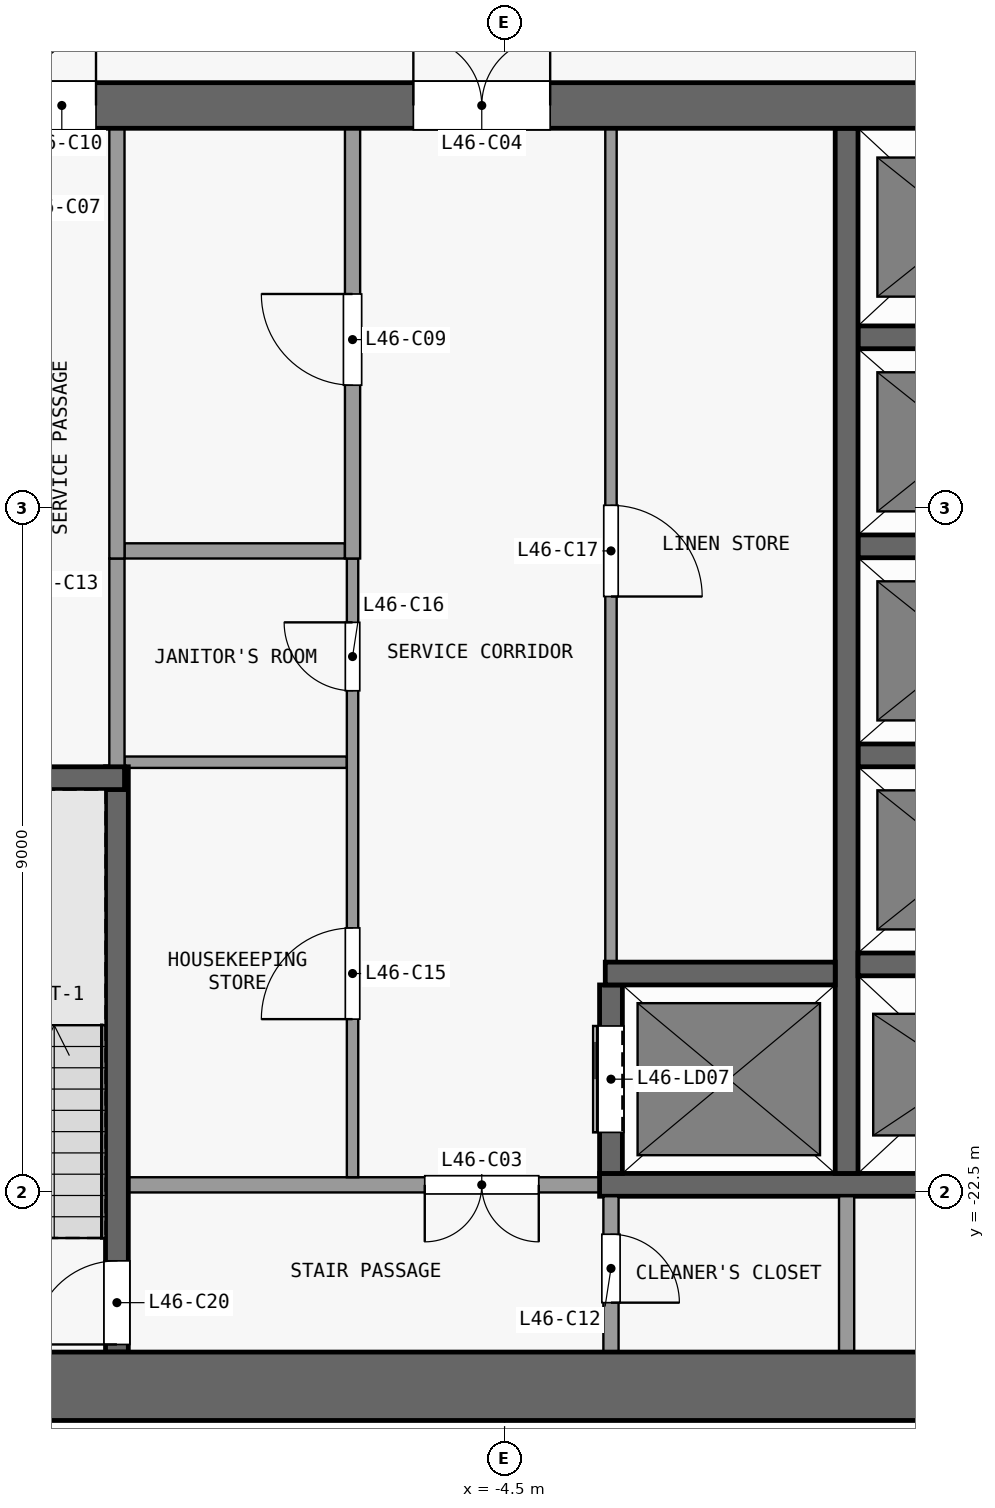
"""IFC4 building model, lengths in metres.
Left out: names, types, materials, properties, quantities, classifications, styles, units other than length and angle.
Written with IfcOpenShell. Run it as: python <this file> out.ifc"""

import sys

from ifc_helpers import new_model, si_unit, direction, frame, frame_2d, origin, place, context, subcontext, project, spatial, rectangle, extrude, element, fill, save


model = new_model("IFC4")
c1 = context("Model", 3, precision=1e-05, world=origin(), true_north=direction((0.0, 1.0)))
c2 = subcontext(c1, "Body", "Model", "MODEL_VIEW")
j1 = project(units=[si_unit("LENGTHUNIT", "METRE"), si_unit("PLANEANGLEUNIT", "RADIAN")], contexts=[c1])
p1 = place(None, origin())
s1 = spatial("IfcSite", under=j1, at=p1, CompositionType="ELEMENT")
p2 = place(p1, origin())
s2 = spatial("IfcBuilding", under=s1, at=p2, CompositionType="ELEMENT")
p3 = place(p2, frame((0.0, 0.0, 185.3)))
s3 = spatial("IfcBuildingStorey", under=s2, at=p3, CompositionType="ELEMENT", Elevation=185.3)
p4 = place(p3, frame((-13.3, -25.05, 0.0), z_axis=(0.0, 0.0, 1.0), x_axis=(1.0, 0.0, 0.0)))
e1 = element("IfcWall", 1, at=p4, inside=s3, PredefinedType="SHEAR", context=c2, shape_type="SweptSolid", body=[
    extrude(rectangle(XDim=26.6, YDim=0.9, at=frame_2d((13.3, 0.0))), origin(), (0.0, 0.0, 1.0), 3.3),
])
p5 = place(p3, frame((-13.3, -8.2, 0.0), z_axis=(0.0, 0.0, 1.0), x_axis=(1.0, 0.0, 0.0)))
e2 = element("IfcWall", 2, at=p5, inside=s3, PredefinedType="SHEAR", context=c2, shape_type="SweptSolid", body=[
    extrude(rectangle(XDim=26.6, YDim=0.6, at=frame_2d((13.3, 0.0))), origin(), (0.0, 0.0, 1.0), 3.3),
])
p6 = place(p5, frame((7.6, 0.0, 0.0)))
e3 = element("IfcOpeningElement", 3, at=p6, cuts=e2, PredefinedType="OPENING", context=c2, shape_type="SweptSolid", body=[
    extrude(rectangle(XDim=1.8, YDim=2.1, at=frame_2d((0.9, 1.05))), frame((0.0, 0.31, 0.0), z_axis=(0.0, -1.0, 0.0), x_axis=(1.0, 0.0, 0.0)), (0.0, 0.0, 1.0), 0.62),
])
p7 = place(p5, frame((17.2, 0.0, 0.0)))
e4 = element("IfcOpeningElement", 4, at=p7, cuts=e2, PredefinedType="OPENING", context=c2, shape_type="SweptSolid", body=[
    extrude(rectangle(XDim=1.8, YDim=2.1, at=frame_2d((0.9, 1.05))), frame((0.0, 0.31, 0.0), z_axis=(0.0, -1.0, 0.0), x_axis=(1.0, 0.0, 0.0)), (0.0, 0.0, 1.0), 0.62),
])
p8 = place(p5, frame((2.525, 0.0, 0.0)))
e5 = element("IfcOpeningElement", 5, at=p8, cuts=e2, PredefinedType="OPENING", context=c2, shape_type="SweptSolid", body=[
    extrude(rectangle(XDim=0.9, YDim=2.1, at=frame_2d((0.45, 1.05))), frame((0.0, 0.31, 0.0), z_axis=(0.0, -1.0, 0.0), x_axis=(1.0, 0.0, 0.0)), (0.0, 0.0, 1.0), 0.62),
])
p9 = place(p5, frame((23.175, 0.0, 0.0)))
e6 = element("IfcOpeningElement", 6, at=p9, cuts=e2, PredefinedType="OPENING", context=c2, shape_type="SweptSolid", body=[
    extrude(rectangle(XDim=0.9, YDim=2.1, at=frame_2d((0.45, 1.05))), frame((0.0, 0.31, 0.0), z_axis=(0.0, -1.0, 0.0), x_axis=(1.0, 0.0, 0.0)), (0.0, 0.0, 1.0), 0.62),
])
p10 = place(p3, frame((-3.25, -22.4, 0.0), z_axis=(0.0, 0.0, 1.0), x_axis=(-1.0, 0.0, 0.0)))
e7 = element("IfcWall", 7, at=p10, inside=s3, PredefinedType="PARTITIONING", context=c2, shape_type="SweptSolid", body=[
    extrude(rectangle(XDim=6.2, YDim=0.2, at=frame_2d((3.1, 0.0))), origin(), (0.0, 0.0, 1.0), 3.3),
])
p11 = place(p10, frame((0.8, 0.0, 0.0)))
e8 = element("IfcOpeningElement", 8, at=p11, cuts=e7, PredefinedType="OPENING", context=c2, shape_type="SweptSolid", body=[
    extrude(rectangle(XDim=1.5, YDim=2.1, at=frame_2d((0.75, 1.05))), frame((0.0, 0.11, 0.0), z_axis=(0.0, -1.0, 0.0), x_axis=(1.0, 0.0, 0.0)), (0.0, 0.0, 1.0), 0.22),
])
p12 = place(p3, frame((-3.25, -22.4, 0.0), z_axis=(0.0, 0.0, 1.0), x_axis=(1.0, 0.0, 0.0)))
e9 = element("IfcWall", 9, at=p12, inside=s3, PredefinedType="SHEAR", context=c2, shape_type="SweptSolid", body=[
    extrude(rectangle(XDim=6.2, YDim=0.3, at=frame_2d((3.1, 0.0))), origin(), (0.0, 0.0, 1.0), 3.3),
])
p13 = place(p3, frame((-3.175, -19.62, 0.0), z_axis=(0.0, 0.0, 1.0), x_axis=(1.0, 0.0, 0.0)))
e10 = element("IfcWall", 10, at=p13, inside=s3, PredefinedType="SHEAR", context=c2, shape_type="SweptSolid", body=[
    extrude(rectangle(XDim=3.025, YDim=0.3, at=frame_2d((1.513, 0.0))), origin(), (0.0, 0.0, 1.0), 3.3),
])
p14 = place(p3, frame((0.15, -19.5, 0.0), z_axis=(0.0, 0.0, 1.0), x_axis=(1.0, 0.0, 0.0)))
e11 = element("IfcWall", 11, at=p14, inside=s3, PredefinedType="SHEAR", context=c2, shape_type="SweptSolid", body=[
    extrude(rectangle(XDim=2.8, YDim=0.3, at=frame_2d((1.4, 0.0))), origin(), (0.0, 0.0, 1.0), 3.3),
])
p15 = place(p3, frame((-12.6, -17.05, 0.0), z_axis=(0.0, 0.0, 1.0), x_axis=(1.0, 0.0, 0.0)))
e12 = element("IfcWall", 12, at=p15, inside=s3, PredefinedType="SHEAR", context=c2, shape_type="SweptSolid", body=[
    extrude(rectangle(XDim=3.1, YDim=0.3, at=frame_2d((1.55, 0.0))), origin(), (0.0, 0.0, 1.0), 3.3),
])
p16 = place(p3, frame((-9.5, -16.84, 0.0), z_axis=(0.0, 0.0, 1.0), x_axis=(1.0, 0.0, 0.0)))
e13 = element("IfcWall", 13, at=p16, inside=s3, PredefinedType="PARTITIONING", context=c2, shape_type="SweptSolid", body=[
    extrude(rectangle(XDim=2.925, YDim=0.15, at=frame_2d((1.462, 0.0))), origin(), (0.0, 0.0, 1.0), 3.3),
])
p17 = place(p3, frame((0.15, -16.75, 0.0), z_axis=(0.0, 0.0, 1.0), x_axis=(1.0, 0.0, 0.0)))
e14 = element("IfcWall", 14, at=p17, inside=s3, PredefinedType="SHEAR", context=c2, shape_type="SweptSolid", body=[
    extrude(rectangle(XDim=2.8, YDim=0.3, at=frame_2d((1.4, 0.0))), origin(), (0.0, 0.0, 1.0), 3.3),
])
p18 = place(p3, frame((-9.5, -14.06, 0.0), z_axis=(0.0, 0.0, 1.0), x_axis=(1.0, 0.0, 0.0)))
e15 = element("IfcWall", 15, at=p18, inside=s3, PredefinedType="PARTITIONING", context=c2, shape_type="SweptSolid", body=[
    extrude(rectangle(XDim=2.9, YDim=0.2, at=frame_2d((1.45, 0.0))), origin(), (0.0, 0.0, 1.0), 3.3),
])
for number, where, z_axis, x_axis in (
    (16, (0.15, -14.0, 0.0), (0.0, 0.0, 1.0), (1.0, 0.0, 0.0)),
    (17, (0.15, -11.25, 0.0), (0.0, 0.0, 1.0), (1.0, 0.0, 0.0)),
):
    element("IfcWall", number, at=place(p3, frame(where, z_axis=z_axis, x_axis=x_axis)), inside=s3, PredefinedType="SHEAR", context=c2, shape_type="SweptSolid", body=[
        extrude(rectangle(XDim=2.8, YDim=0.3, at=frame_2d((1.4, 0.0))), origin(), (0.0, 0.0, 1.0), 3.3),
    ])
p19 = place(p3, frame((-9.6, -24.6, 0.0), z_axis=(0.0, 0.0, 1.0), x_axis=(0.0, 1.0, 0.0)))
e18 = element("IfcWall", 18, at=p19, inside=s3, PredefinedType="SHEAR", context=c2, shape_type="SweptSolid", body=[
    extrude(rectangle(XDim=7.7, YDim=0.3, at=frame_2d((3.85, 0.0))), origin(), (0.0, 0.0, 1.0), 3.3),
])
p20 = place(p19, frame((0.1, 0.0, 0.0)))
e19 = element("IfcOpeningElement", 19, at=p20, cuts=e18, PredefinedType="OPENING", context=c2, shape_type="SweptSolid", body=[
    extrude(rectangle(XDim=1.1, YDim=2.1, at=frame_2d((0.55, 1.05))), frame((0.0, 0.16, 0.0), z_axis=(0.0, -1.0, 0.0), x_axis=(1.0, 0.0, 0.0)), (0.0, 0.0, 1.0), 0.32),
])
p21 = place(p3, frame((-9.6, -16.9, 0.0), z_axis=(0.0, 0.0, 1.0), x_axis=(0.0, 1.0, 0.0)))
e20 = element("IfcWall", 20, at=p21, inside=s3, PredefinedType="PARTITIONING", context=c2, shape_type="SweptSolid", body=[
    extrude(rectangle(XDim=2.74, YDim=0.2, at=frame_2d((1.37, 0.0))), origin(), (0.0, 0.0, 1.0), 3.3),
])
p22 = place(p3, frame((-9.6, -14.16, 0.0), z_axis=(0.0, 0.0, 1.0), x_axis=(0.0, 1.0, 0.0)))
e21 = element("IfcWall", 21, at=p22, inside=s3, PredefinedType="PARTITIONING", context=c2, shape_type="SweptSolid", body=[
    extrude(rectangle(XDim=5.66, YDim=0.2, at=frame_2d((2.83, 0.0))), origin(), (0.0, 0.0, 1.0), 3.3),
])
p23 = place(p3, frame((-6.5, -22.3, 0.0), z_axis=(0.0, 0.0, 1.0), x_axis=(0.0, 1.0, 0.0)))
e22 = element("IfcWall", 22, at=p23, inside=s3, PredefinedType="PARTITIONING", context=c2, shape_type="SweptSolid", body=[
    extrude(rectangle(XDim=8.14, YDim=0.15, at=frame_2d((4.07, 0.0))), origin(), (0.0, 0.0, 1.0), 3.3),
])
p24 = place(p23, frame((2.08, 0.0, 0.0)))
e23 = element("IfcOpeningElement", 23, at=p24, cuts=e22, PredefinedType="OPENING", context=c2, shape_type="SweptSolid", body=[
    extrude(rectangle(XDim=1.2, YDim=2.1, at=frame_2d((0.6, 1.05))), frame((0.0, 0.085, 0.0), z_axis=(0.0, -1.0, 0.0), x_axis=(1.0, 0.0, 0.0)), (0.0, 0.0, 1.0), 0.17),
])
p25 = place(p23, frame((6.4, 0.0, 0.0)))
e24 = element("IfcOpeningElement", 24, at=p25, cuts=e22, PredefinedType="OPENING", context=c2, shape_type="SweptSolid", body=[
    extrude(rectangle(XDim=0.9, YDim=2.1, at=frame_2d((0.45, 1.05))), frame((0.0, 0.085, 0.0), z_axis=(0.0, -1.0, 0.0), x_axis=(1.0, 0.0, 0.0)), (0.0, 0.0, 1.0), 0.17),
])
p26 = place(p3, frame((-6.5, -14.16, 0.0), z_axis=(0.0, 0.0, 1.0), x_axis=(0.0, 1.0, 0.0)))
e25 = element("IfcWall", 25, at=p26, inside=s3, PredefinedType="PARTITIONING", context=c2, shape_type="SweptSolid", body=[
    extrude(rectangle(XDim=5.66, YDim=0.2, at=frame_2d((2.83, 0.0))), origin(), (0.0, 0.0, 1.0), 3.3),
])
p27 = place(p26, frame((2.28, 0.0, 0.0)))
e26 = element("IfcOpeningElement", 26, at=p27, cuts=e25, PredefinedType="OPENING", context=c2, shape_type="SweptSolid", body=[
    extrude(rectangle(XDim=1.2, YDim=2.1, at=frame_2d((0.6, 1.05))), frame((0.0, 0.11, 0.0), z_axis=(0.0, -1.0, 0.0), x_axis=(1.0, 0.0, 0.0)), (0.0, 0.0, 1.0), 0.22),
])
p28 = place(p3, frame((-3.1, -22.55, 0.0), z_axis=(0.0, 0.0, 1.0), x_axis=(0.0, -1.0, 0.0)))
e27 = element("IfcWall", 27, at=p28, inside=s3, PredefinedType="PARTITIONING", context=c2, shape_type="SweptSolid", body=[
    extrude(rectangle(XDim=2.05, YDim=0.2, at=frame_2d((1.025, 0.0))), origin(), (0.0, 0.0, 1.0), 3.3),
])
p29 = place(p28, frame((0.5, 0.0, 0.0)))
e28 = element("IfcOpeningElement", 28, at=p29, cuts=e27, PredefinedType="OPENING", context=c2, shape_type="SweptSolid", body=[
    extrude(rectangle(XDim=0.9, YDim=2.1, at=frame_2d((0.45, 1.05))), frame((0.0, 0.11, 0.0), z_axis=(0.0, -1.0, 0.0), x_axis=(1.0, 0.0, 0.0)), (0.0, 0.0, 1.0), 0.22),
])
p30 = place(p3, frame((-3.1, -22.25, 0.0), z_axis=(0.0, 0.0, 1.0), x_axis=(0.0, 1.0, 0.0)))
e29 = element("IfcWall", 29, at=p30, inside=s3, PredefinedType="SHEAR", context=c2, shape_type="SweptSolid", body=[
    extrude(rectangle(XDim=2.48, YDim=0.3, at=frame_2d((1.24, 0.0))), origin(), (0.0, 0.0, 1.0), 3.3),
])
p31 = place(p30, frame((0.54, 0.0, 0.0)))
e30 = element("IfcOpeningElement", 30, at=p31, cuts=e29, PredefinedType="OPENING", context=c2, shape_type="SweptSolid", body=[
    extrude(rectangle(XDim=1.4, YDim=2.1, at=frame_2d((0.7, 1.05))), frame((0.0, 0.16, 0.0), z_axis=(0.0, -1.0, 0.0), x_axis=(1.0, 0.0, 0.0)), (0.0, 0.0, 1.0), 0.32),
])
p32 = place(p3, frame((-3.1, -8.5, 0.0), z_axis=(0.0, 0.0, 1.0), x_axis=(0.0, -1.0, 0.0)))
e31 = element("IfcWall", 31, at=p32, inside=s3, PredefinedType="PARTITIONING", context=c2, shape_type="SweptSolid", body=[
    extrude(rectangle(XDim=10.97, YDim=0.15, at=frame_2d((5.485, 0.0))), origin(), (0.0, 0.0, 1.0), 3.3),
])
p33 = place(p32, frame((4.96, 0.0, 0.0)))
e32 = element("IfcOpeningElement", 32, at=p33, cuts=e31, PredefinedType="OPENING", context=c2, shape_type="SweptSolid", body=[
    extrude(rectangle(XDim=1.2, YDim=2.1, at=frame_2d((0.6, 1.05))), frame((0.0, 0.085, 0.0), z_axis=(0.0, -1.0, 0.0), x_axis=(1.0, 0.0, 0.0)), (0.0, 0.0, 1.0), 0.17),
])
p34 = place(p3, frame((0.0, -24.6, 0.0), z_axis=(0.0, 0.0, 1.0), x_axis=(0.0, 1.0, 0.0)))
e33 = element("IfcWall", 33, at=p34, inside=s3, PredefinedType="PARTITIONING", context=c2, shape_type="SweptSolid", body=[
    extrude(rectangle(XDim=2.05, YDim=0.2, at=frame_2d((1.025, 0.0))), origin(), (0.0, 0.0, 1.0), 3.3),
])
p35 = place(p3, frame((0.0, -22.25, 0.0), z_axis=(0.0, 0.0, 1.0), x_axis=(0.0, 1.0, 0.0)))
e34 = element("IfcWall", 34, at=p35, inside=s3, PredefinedType="SHEAR", context=c2, shape_type="SweptSolid", body=[
    extrude(rectangle(XDim=13.75, YDim=0.3, at=frame_2d((6.875, 0.0))), origin(), (0.0, 0.0, 1.0), 3.3),
])
p36 = place(p31, origin())
e35 = element("IfcDoor", 35, at=p36, inside=s3, OperationType="DOUBLE_DOOR_SLIDING", PredefinedType="DOOR", context=c2, shape_type="SweptSolid", body=[
    extrude(rectangle(XDim=1.4, YDim=2.1, at=frame_2d((0.7, 1.05))), frame((0.0, 0.025, 0.0), z_axis=(0.0, -1.0, 0.0), x_axis=(1.0, 0.0, 0.0)), (0.0, 0.0, 1.0), 0.05),
])
fill(e30, e35)
p37 = place(p11, origin())
e36 = element("IfcDoor", 36, at=p37, inside=s3, OperationType="DOUBLE_DOOR_SINGLE_SWING", PredefinedType="DOOR", context=c2, shape_type="SweptSolid", body=[
    extrude(rectangle(XDim=1.5, YDim=2.1, at=frame_2d((0.75, 1.05))), frame((0.0, 0.025, 0.0), z_axis=(0.0, -1.0, 0.0), x_axis=(1.0, 0.0, 0.0)), (0.0, 0.0, 1.0), 0.05),
])
fill(e8, e36)
p38 = place(p6, origin())
e37 = element("IfcDoor", 37, at=p38, inside=s3, OperationType="DOUBLE_DOOR_SINGLE_SWING", PredefinedType="DOOR", context=c2, shape_type="SweptSolid", body=[
    extrude(rectangle(XDim=1.8, YDim=2.1, at=frame_2d((0.9, 1.05))), frame((0.0, 0.025, 0.0), z_axis=(0.0, -1.0, 0.0), x_axis=(1.0, 0.0, 0.0)), (0.0, 0.0, 1.0), 0.05),
])
fill(e3, e37)
p39 = place(p27, origin())
e38 = element("IfcDoor", 38, at=p39, inside=s3, OperationType="SINGLE_SWING_RIGHT", PredefinedType="DOOR", context=c2, shape_type="SweptSolid", body=[
    extrude(rectangle(XDim=1.2, YDim=2.1, at=frame_2d((0.6, 1.05))), frame((0.0, 0.025, 0.0), z_axis=(0.0, -1.0, 0.0), x_axis=(1.0, 0.0, 0.0)), (0.0, 0.0, 1.0), 0.05),
])
fill(e26, e38)
p40 = place(p8, origin())
e39 = element("IfcDoor", 39, at=p40, inside=s3, OperationType="SINGLE_SWING_RIGHT", PredefinedType="DOOR", context=c2, shape_type="SweptSolid", body=[
    extrude(rectangle(XDim=0.9, YDim=2.1, at=frame_2d((0.45, 1.05))), frame((0.0, 0.025, 0.0), z_axis=(0.0, -1.0, 0.0), x_axis=(1.0, 0.0, 0.0)), (0.0, 0.0, 1.0), 0.05),
])
fill(e5, e39)
p41 = place(p29, origin())
e40 = element("IfcDoor", 40, at=p41, inside=s3, OperationType="SINGLE_SWING_RIGHT", PredefinedType="DOOR", context=c2, shape_type="SweptSolid", body=[
    extrude(rectangle(XDim=0.9, YDim=2.1, at=frame_2d((0.45, 1.05))), frame((0.0, 0.025, 0.0), z_axis=(0.0, -1.0, 0.0), x_axis=(1.0, 0.0, 0.0)), (0.0, 0.0, 1.0), 0.05),
])
fill(e28, e40)
p42 = place(p24, origin())
e41 = element("IfcDoor", 41, at=p42, inside=s3, OperationType="SINGLE_SWING_LEFT", PredefinedType="DOOR", context=c2, shape_type="SweptSolid", body=[
    extrude(rectangle(XDim=1.2, YDim=2.1, at=frame_2d((0.6, 1.05))), frame((0.0, 0.025, 0.0), z_axis=(0.0, -1.0, 0.0), x_axis=(1.0, 0.0, 0.0)), (0.0, 0.0, 1.0), 0.05),
])
fill(e23, e41)
p43 = place(p25, origin())
e42 = element("IfcDoor", 42, at=p43, inside=s3, OperationType="SINGLE_SWING_RIGHT", PredefinedType="DOOR", context=c2, shape_type="SweptSolid", body=[
    extrude(rectangle(XDim=0.9, YDim=2.1, at=frame_2d((0.45, 1.05))), frame((0.0, 0.025, 0.0), z_axis=(0.0, -1.0, 0.0), x_axis=(1.0, 0.0, 0.0)), (0.0, 0.0, 1.0), 0.05),
])
fill(e24, e42)
p44 = place(p33, origin())
e43 = element("IfcDoor", 43, at=p44, inside=s3, OperationType="SINGLE_SWING_RIGHT", PredefinedType="DOOR", context=c2, shape_type="SweptSolid", body=[
    extrude(rectangle(XDim=1.2, YDim=2.1, at=frame_2d((0.6, 1.05))), frame((0.0, 0.025, 0.0), z_axis=(0.0, -1.0, 0.0), x_axis=(1.0, 0.0, 0.0)), (0.0, 0.0, 1.0), 0.05),
])
fill(e32, e43)
p45 = place(p20, origin())
e44 = element("IfcDoor", 44, at=p45, inside=s3, OperationType="SINGLE_SWING_LEFT", PredefinedType="DOOR", context=c2, shape_type="SweptSolid", body=[
    extrude(rectangle(XDim=1.1, YDim=2.1, at=frame_2d((0.55, 1.05))), frame((0.0, 0.025, 0.0), z_axis=(0.0, -1.0, 0.0), x_axis=(1.0, 0.0, 0.0)), (0.0, 0.0, 1.0), 0.05),
])
fill(e19, e44)
save(model, sys.argv[1])
